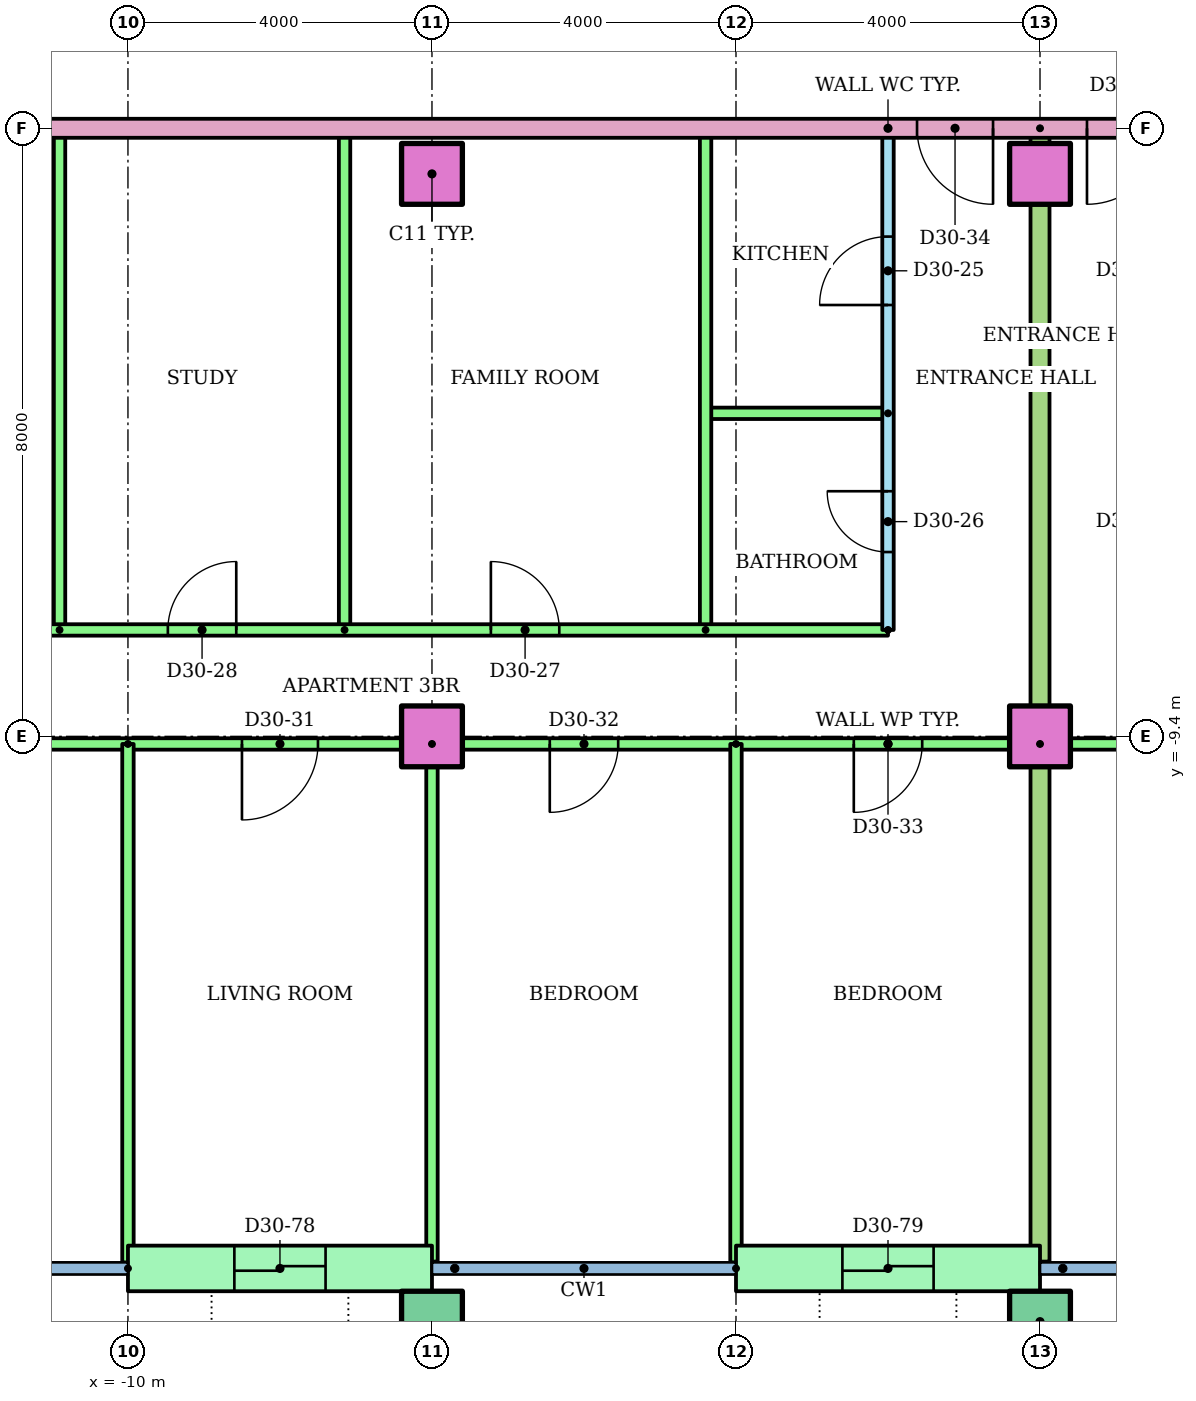
"""IFC4 building model, lengths in metres.
Left out: names, types, materials, properties, quantities, classifications, styles, units other than length and angle.
Written with IfcOpenShell. Run it as: python <this file> out.ifc"""

import sys

from ifc_helpers import new_model, si_unit, direction, frame, frame_2d, origin, origin_2d, place, context, subcontext, project, spatial, rectangle, hollow_rectangle, extrude, element, fill, save


model = new_model("IFC4")
c1 = context("Model", 3, precision=1e-05, world=origin(), true_north=direction((0.0, 1.0)))
c2 = subcontext(c1, "Body", "Model", "MODEL_VIEW")
j1 = project(units=[si_unit("LENGTHUNIT", "METRE"), si_unit("PLANEANGLEUNIT", "RADIAN")], contexts=[c1])
p1 = place(None, origin())
s1 = spatial("IfcSite", under=j1, at=p1, CompositionType="ELEMENT")
p2 = place(p1, origin())
s2 = spatial("IfcBuilding", under=s1, at=p2, CompositionType="ELEMENT")
p3 = place(p2, frame((0.0, 0.0, 119.8)))
s3 = spatial("IfcBuildingStorey", under=s2, at=p3, CompositionType="ELEMENT", Elevation=119.8)
for number, where in (
    (1, (-6.0, -17.1, 0.0)),
    (2, (2.0, -17.1, 0.0)),
):
    element("IfcColumn", number, at=place(p3, frame(where)), inside=s3, PredefinedType="COLUMN", context=c2, shape_type="SweptSolid", body=[
        extrude(hollow_rectangle(XDim=0.8, YDim=0.8, WallThickness=0.04, at=origin_2d()), origin(), (0.0, 0.0, 1.0), 3.2),
    ])
for number, where in (
    (3, (-6.0, -9.4, 0.0)),
    (4, (2.0, -9.4, 0.0)),
    (5, (-6.0, -2.0, 0.0)),
    (6, (2.0, -2.0, 0.0)),
):
    element("IfcColumn", number, at=place(p3, frame(where)), inside=s3, PredefinedType="COLUMN", context=c2, shape_type="SweptSolid", body=[
        extrude(rectangle(XDim=0.8, YDim=0.8, at=origin_2d()), origin(), (0.0, 0.0, 1.0), 3.2),
    ])
p4 = place(p3, frame((-10.0, -16.4, 0.0)))
e7 = element("IfcWall", 7, at=p4, inside=s3, PredefinedType="STANDARD", context=c2, shape_type="SweptSolid", body=[
    extrude(rectangle(XDim=4.0, YDim=0.6, at=frame_2d((2.0, 0.0))), origin(), (0.0, 0.0, 1.0), 2.92),
])
p5 = place(p4, frame((1.4, 0.0, 0.0)))
e8 = element("IfcOpeningElement", 8, at=p5, cuts=e7, PredefinedType="OPENING", context=c2, shape_type="SweptSolid", body=[
    extrude(rectangle(XDim=1.2, YDim=2.1, at=frame_2d((0.6, 1.05))), frame((0.0, 0.31, 0.0), z_axis=(0.0, -1.0, 0.0), x_axis=(1.0, 0.0, 0.0)), (0.0, 0.0, 1.0), 0.62),
])
p6 = place(p3, frame((-2.0, -16.4, 0.0)))
e9 = element("IfcWall", 9, at=p6, inside=s3, PredefinedType="STANDARD", context=c2, shape_type="SweptSolid", body=[
    extrude(rectangle(XDim=4.0, YDim=0.6, at=frame_2d((2.0, 0.0))), origin(), (0.0, 0.0, 1.0), 2.92),
])
p7 = place(p6, frame((1.4, 0.0, 0.0)))
e10 = element("IfcOpeningElement", 10, at=p7, cuts=e9, PredefinedType="OPENING", context=c2, shape_type="SweptSolid", body=[
    extrude(rectangle(XDim=1.2, YDim=2.1, at=frame_2d((0.6, 1.05))), frame((0.0, 0.31, 0.0), z_axis=(0.0, -1.0, 0.0), x_axis=(1.0, 0.0, 0.0)), (0.0, 0.0, 1.0), 0.62),
])
p8 = place(p3, frame((0.0, -8.0, 0.0), z_axis=(0.0, 0.0, 1.0), x_axis=(0.0, 1.0, 0.0)))
e11 = element("IfcWall", 11, at=p8, inside=s3, PredefinedType="PARTITIONING", context=c2, shape_type="SweptSolid", body=[
    extrude(rectangle(XDim=6.6, YDim=0.15, at=frame_2d((3.3, 0.0))), origin(), (0.0, 0.0, 1.0), 2.4),
])
p9 = place(p8, frame((4.275, 0.0, 0.0)))
e12 = element("IfcOpeningElement", 12, at=p9, cuts=e11, PredefinedType="OPENING", context=c2, shape_type="SweptSolid", body=[
    extrude(rectangle(XDim=0.9, YDim=2.1, at=frame_2d((0.45, 1.05))), frame((0.0, 0.085, 0.0), z_axis=(0.0, -1.0, 0.0), x_axis=(1.0, 0.0, 0.0)), (0.0, 0.0, 1.0), 0.17),
])
p10 = place(p8, frame((1.025, 0.0, 0.0)))
e13 = element("IfcOpeningElement", 13, at=p10, cuts=e11, PredefinedType="OPENING", context=c2, shape_type="SweptSolid", body=[
    extrude(rectangle(XDim=0.8, YDim=2.1, at=frame_2d((0.4, 1.05))), frame((0.0, 0.085, 0.0), z_axis=(0.0, -1.0, 0.0), x_axis=(1.0, 0.0, 0.0)), (0.0, 0.0, 1.0), 0.17),
])
p11 = place(p3, frame((0.0, -5.15, 0.0), z_axis=(0.0, 0.0, 1.0), x_axis=(-1.0, 0.0, 0.0)))
e14 = element("IfcWall", 14, at=p11, inside=s3, PredefinedType="PARTITIONING", context=c2, shape_type="SweptSolid", body=[
    extrude(rectangle(XDim=2.4, YDim=0.15, at=frame_2d((1.2, 0.0))), origin(), (0.0, 0.0, 1.0), 2.4),
])
for number, where, z_axis, x_axis in (
    (15, (-2.4, -8.0, 0.0), (0.0, 0.0, 1.0), (0.0, 1.0, 0.0)),
    (16, (-7.15, -8.0, 0.0), (0.0, 0.0, 1.0), (0.0, 1.0, 0.0)),
    (17, (-10.9, -8.0, 0.0), (0.0, 0.0, 1.0), (0.0, 1.0, 0.0)),
):
    element("IfcWall", number, at=place(p3, frame(where, z_axis=z_axis, x_axis=x_axis)), inside=s3, PredefinedType="PARTITIONING", context=c2, shape_type="SweptSolid", body=[
        extrude(rectangle(XDim=6.6, YDim=0.15, at=frame_2d((3.3, 0.0))), origin(), (0.0, 0.0, 1.0), 2.4),
    ])
p12 = place(p3, frame((-14.0, -8.0, 0.0)))
e18 = element("IfcWall", 18, at=p12, inside=s3, PredefinedType="PARTITIONING", context=c2, shape_type="SweptSolid", body=[
    extrude(rectangle(XDim=14.0, YDim=0.15, at=frame_2d((7.0, 0.0))), origin(), (0.0, 0.0, 1.0), 2.4),
])
p13 = place(p12, frame((8.775, 0.0, 0.0)))
e19 = element("IfcOpeningElement", 19, at=p13, cuts=e18, PredefinedType="OPENING", context=c2, shape_type="SweptSolid", body=[
    extrude(rectangle(XDim=0.9, YDim=2.1, at=frame_2d((0.45, 1.05))), frame((0.0, 0.085, 0.0), z_axis=(0.0, -1.0, 0.0), x_axis=(1.0, 0.0, 0.0)), (0.0, 0.0, 1.0), 0.17),
])
p14 = place(p12, frame((4.525, 0.0, 0.0)))
e20 = element("IfcOpeningElement", 20, at=p14, cuts=e18, PredefinedType="OPENING", context=c2, shape_type="SweptSolid", body=[
    extrude(rectangle(XDim=0.9, YDim=2.1, at=frame_2d((0.45, 1.05))), frame((0.0, 0.085, 0.0), z_axis=(0.0, -1.0, 0.0), x_axis=(1.0, 0.0, 0.0)), (0.0, 0.0, 1.0), 0.17),
])
p15 = place(p12, frame((1.1, 0.0, 0.0)))
e21 = element("IfcOpeningElement", 21, at=p15, cuts=e18, PredefinedType="OPENING", context=c2, shape_type="SweptSolid", body=[
    extrude(rectangle(XDim=0.9, YDim=2.1, at=frame_2d((0.45, 1.05))), frame((0.0, 0.085, 0.0), z_axis=(0.0, -1.0, 0.0), x_axis=(1.0, 0.0, 0.0)), (0.0, 0.0, 1.0), 0.17),
])
p16 = place(p3, frame((2.0, -9.5, 0.0), z_axis=(0.0, 0.0, 1.0), x_axis=(-1.0, 0.0, 0.0)))
e22 = element("IfcWall", 22, at=p16, inside=s3, PredefinedType="PARTITIONING", context=c2, shape_type="SweptSolid", body=[
    extrude(rectangle(XDim=16.0, YDim=0.15, at=frame_2d((8.0, 0.0))), origin(), (0.0, 0.0, 1.0), 2.4),
])
p17 = place(p16, frame((13.55, 0.0, 0.0)))
e23 = element("IfcOpeningElement", 23, at=p17, cuts=e22, PredefinedType="OPENING", context=c2, shape_type="SweptSolid", body=[
    extrude(rectangle(XDim=0.9, YDim=2.1, at=frame_2d((0.45, 1.05))), frame((0.0, 0.085, 0.0), z_axis=(0.0, -1.0, 0.0), x_axis=(1.0, 0.0, 0.0)), (0.0, 0.0, 1.0), 0.17),
])
p18 = place(p16, frame((9.5, 0.0, 0.0)))
e24 = element("IfcOpeningElement", 24, at=p18, cuts=e22, PredefinedType="OPENING", context=c2, shape_type="SweptSolid", body=[
    extrude(rectangle(XDim=1.0, YDim=2.1, at=frame_2d((0.5, 1.05))), frame((0.0, 0.085, 0.0), z_axis=(0.0, -1.0, 0.0), x_axis=(1.0, 0.0, 0.0)), (0.0, 0.0, 1.0), 0.17),
])
p19 = place(p16, frame((5.55, 0.0, 0.0)))
e25 = element("IfcOpeningElement", 25, at=p19, cuts=e22, PredefinedType="OPENING", context=c2, shape_type="SweptSolid", body=[
    extrude(rectangle(XDim=0.9, YDim=2.1, at=frame_2d((0.45, 1.05))), frame((0.0, 0.085, 0.0), z_axis=(0.0, -1.0, 0.0), x_axis=(1.0, 0.0, 0.0)), (0.0, 0.0, 1.0), 0.17),
])
p20 = place(p16, frame((1.55, 0.0, 0.0)))
e26 = element("IfcOpeningElement", 26, at=p20, cuts=e22, PredefinedType="OPENING", context=c2, shape_type="SweptSolid", body=[
    extrude(rectangle(XDim=0.9, YDim=2.1, at=frame_2d((0.45, 1.05))), frame((0.0, 0.085, 0.0), z_axis=(0.0, -1.0, 0.0), x_axis=(1.0, 0.0, 0.0)), (0.0, 0.0, 1.0), 0.17),
])
p21 = place(p3, frame((-10.0, -9.5, 0.0), z_axis=(0.0, 0.0, 1.0), x_axis=(0.0, -1.0, 0.0)))
e27 = element("IfcWall", 27, at=p21, inside=s3, PredefinedType="PARTITIONING", context=c2, shape_type="SweptSolid", body=[
    extrude(rectangle(XDim=6.821, YDim=0.15, at=frame_2d((3.411, 0.0))), origin(), (0.0, 0.0, 1.0), 2.4),
])
p22 = place(p3, frame((-6.0, -9.5, 0.0), z_axis=(0.0, 0.0, 1.0), x_axis=(0.0, -1.0, 0.0)))
e28 = element("IfcWall", 28, at=p22, inside=s3, PredefinedType="PARTITIONING", context=c2, shape_type="SweptSolid", body=[
    extrude(rectangle(XDim=6.81, YDim=0.15, at=frame_2d((3.405, 0.0))), origin(), (0.0, 0.0, 1.0), 2.4),
])
p23 = place(p3, frame((-2.0, -9.5, 0.0), z_axis=(0.0, 0.0, 1.0), x_axis=(0.0, -1.0, 0.0)))
e29 = element("IfcWall", 29, at=p23, inside=s3, PredefinedType="PARTITIONING", context=c2, shape_type="SweptSolid", body=[
    extrude(rectangle(XDim=6.821, YDim=0.15, at=frame_2d((3.411, 0.0))), origin(), (0.0, 0.0, 1.0), 2.4),
])
p24 = place(p3, frame((18.0, -9.5, 0.0), z_axis=(0.0, 0.0, 1.0), x_axis=(-1.0, 0.0, 0.0)))
e30 = element("IfcWall", 30, at=p24, inside=s3, PredefinedType="PARTITIONING", context=c2, shape_type="SweptSolid", body=[
    extrude(rectangle(XDim=16.0, YDim=0.15, at=frame_2d((8.0, 0.0))), origin(), (0.0, 0.0, 1.0), 2.4),
])
p25 = place(p24, frame((13.55, 0.0, 0.0)))
e31 = element("IfcOpeningElement", 31, at=p25, cuts=e30, PredefinedType="OPENING", context=c2, shape_type="SweptSolid", body=[
    extrude(rectangle(XDim=0.9, YDim=2.1, at=frame_2d((0.45, 1.05))), frame((0.0, 0.085, 0.0), z_axis=(0.0, -1.0, 0.0), x_axis=(1.0, 0.0, 0.0)), (0.0, 0.0, 1.0), 0.17),
])
p26 = place(p24, frame((9.55, 0.0, 0.0)))
e32 = element("IfcOpeningElement", 32, at=p26, cuts=e30, PredefinedType="OPENING", context=c2, shape_type="SweptSolid", body=[
    extrude(rectangle(XDim=0.9, YDim=2.1, at=frame_2d((0.45, 1.05))), frame((0.0, 0.085, 0.0), z_axis=(0.0, -1.0, 0.0), x_axis=(1.0, 0.0, 0.0)), (0.0, 0.0, 1.0), 0.17),
])
p27 = place(p24, frame((5.55, 0.0, 0.0)))
e33 = element("IfcOpeningElement", 33, at=p27, cuts=e30, PredefinedType="OPENING", context=c2, shape_type="SweptSolid", body=[
    extrude(rectangle(XDim=0.9, YDim=2.1, at=frame_2d((0.45, 1.05))), frame((0.0, 0.085, 0.0), z_axis=(0.0, -1.0, 0.0), x_axis=(1.0, 0.0, 0.0)), (0.0, 0.0, 1.0), 0.17),
])
p28 = place(p24, frame((1.5, 0.0, 0.0)))
e34 = element("IfcOpeningElement", 34, at=p28, cuts=e30, PredefinedType="OPENING", context=c2, shape_type="SweptSolid", body=[
    extrude(rectangle(XDim=1.0, YDim=2.1, at=frame_2d((0.5, 1.05))), frame((0.0, 0.085, 0.0), z_axis=(0.0, -1.0, 0.0), x_axis=(1.0, 0.0, 0.0)), (0.0, 0.0, 1.0), 0.17),
])
p29 = place(p3, frame((2.0, -1.4, 0.0), z_axis=(0.0, 0.0, 1.0), x_axis=(0.0, -1.0, 0.0)))
e35 = element("IfcWall", 35, at=p29, inside=s3, PredefinedType="PARTITIONING", context=c2, shape_type="SweptSolid", body=[
    extrude(rectangle(XDim=14.91, YDim=0.25, at=frame_2d((7.455, 0.0))), origin(), (0.0, 0.0, 1.0), 2.4),
])
p30 = place(p3, frame((14.0, -1.4, 0.0), z_axis=(0.0, 0.0, 1.0), x_axis=(-1.0, 0.0, 0.0)))
e36 = element("IfcWall", 36, at=p30, inside=s3, PredefinedType="PARTITIONING", context=c2, shape_type="SweptSolid", body=[
    extrude(rectangle(XDim=28.0, YDim=0.25, at=frame_2d((14.0, 0.0))), origin(), (0.0, 0.0, 1.0), 2.4),
])
p31 = place(p30, frame((12.618, 0.0, 0.0)))
e37 = element("IfcOpeningElement", 37, at=p31, cuts=e36, PredefinedType="OPENING", context=c2, shape_type="SweptSolid", body=[
    extrude(rectangle(XDim=1.0, YDim=2.1, at=frame_2d((0.5, 1.05))), frame((0.0, 0.135, 0.0), z_axis=(0.0, -1.0, 0.0), x_axis=(1.0, 0.0, 0.0)), (0.0, 0.0, 1.0), 0.27),
])
p32 = place(p30, frame((10.382, 0.0, 0.0)))
e38 = element("IfcOpeningElement", 38, at=p32, cuts=e36, PredefinedType="OPENING", context=c2, shape_type="SweptSolid", body=[
    extrude(rectangle(XDim=1.0, YDim=2.1, at=frame_2d((0.5, 1.05))), frame((0.0, 0.135, 0.0), z_axis=(0.0, -1.0, 0.0), x_axis=(1.0, 0.0, 0.0)), (0.0, 0.0, 1.0), 0.27),
])
p33 = place(p9, origin())
e39 = element("IfcDoor", 39, at=p33, inside=s3, OperationType="SINGLE_SWING_LEFT", PredefinedType="DOOR", context=c2, shape_type="SweptSolid", body=[
    extrude(rectangle(XDim=0.9, YDim=2.1, at=frame_2d((0.45, 1.05))), frame((0.0, 0.025, 0.0), z_axis=(0.0, -1.0, 0.0), x_axis=(1.0, 0.0, 0.0)), (0.0, 0.0, 1.0), 0.05),
])
fill(e12, e39)
p34 = place(p10, origin())
e40 = element("IfcDoor", 40, at=p34, inside=s3, OperationType="SINGLE_SWING_RIGHT", PredefinedType="DOOR", context=c2, shape_type="SweptSolid", body=[
    extrude(rectangle(XDim=0.8, YDim=2.1, at=frame_2d((0.4, 1.05))), frame((0.0, 0.025, 0.0), z_axis=(0.0, -1.0, 0.0), x_axis=(1.0, 0.0, 0.0)), (0.0, 0.0, 1.0), 0.05),
])
fill(e13, e40)
p35 = place(p13, origin())
e41 = element("IfcDoor", 41, at=p35, inside=s3, OperationType="SINGLE_SWING_LEFT", PredefinedType="DOOR", context=c2, shape_type="SweptSolid", body=[
    extrude(rectangle(XDim=0.9, YDim=2.1, at=frame_2d((0.45, 1.05))), frame((0.0, 0.025, 0.0), z_axis=(0.0, -1.0, 0.0), x_axis=(1.0, 0.0, 0.0)), (0.0, 0.0, 1.0), 0.05),
])
fill(e19, e41)
p36 = place(p14, origin())
e42 = element("IfcDoor", 42, at=p36, inside=s3, OperationType="SINGLE_SWING_RIGHT", PredefinedType="DOOR", context=c2, shape_type="SweptSolid", body=[
    extrude(rectangle(XDim=0.9, YDim=2.1, at=frame_2d((0.45, 1.05))), frame((0.0, 0.025, 0.0), z_axis=(0.0, -1.0, 0.0), x_axis=(1.0, 0.0, 0.0)), (0.0, 0.0, 1.0), 0.05),
])
fill(e20, e42)
p37 = place(p18, origin())
e43 = element("IfcDoor", 43, at=p37, inside=s3, OperationType="SINGLE_SWING_RIGHT", PredefinedType="DOOR", context=c2, shape_type="SweptSolid", body=[
    extrude(rectangle(XDim=1.0, YDim=2.1, at=frame_2d((0.5, 1.05))), frame((0.0, 0.025, 0.0), z_axis=(0.0, -1.0, 0.0), x_axis=(1.0, 0.0, 0.0)), (0.0, 0.0, 1.0), 0.05),
])
fill(e24, e43)
p38 = place(p19, origin())
e44 = element("IfcDoor", 44, at=p38, inside=s3, OperationType="SINGLE_SWING_RIGHT", PredefinedType="DOOR", context=c2, shape_type="SweptSolid", body=[
    extrude(rectangle(XDim=0.9, YDim=2.1, at=frame_2d((0.45, 1.05))), frame((0.0, 0.025, 0.0), z_axis=(0.0, -1.0, 0.0), x_axis=(1.0, 0.0, 0.0)), (0.0, 0.0, 1.0), 0.05),
])
fill(e25, e44)
p39 = place(p20, origin())
e45 = element("IfcDoor", 45, at=p39, inside=s3, OperationType="SINGLE_SWING_RIGHT", PredefinedType="DOOR", context=c2, shape_type="SweptSolid", body=[
    extrude(rectangle(XDim=0.9, YDim=2.1, at=frame_2d((0.45, 1.05))), frame((0.0, 0.025, 0.0), z_axis=(0.0, -1.0, 0.0), x_axis=(1.0, 0.0, 0.0)), (0.0, 0.0, 1.0), 0.05),
])
fill(e26, e45)
p40 = place(p31, origin())
e46 = element("IfcDoor", 46, at=p40, inside=s3, OperationType="SINGLE_SWING_LEFT", PredefinedType="DOOR", context=c2, shape_type="SweptSolid", body=[
    extrude(rectangle(XDim=1.0, YDim=2.1, at=frame_2d((0.5, 1.05))), frame((0.0, 0.025, 0.0), z_axis=(0.0, -1.0, 0.0), x_axis=(1.0, 0.0, 0.0)), (0.0, 0.0, 1.0), 0.05),
])
fill(e37, e46)
p41 = place(p32, origin())
e47 = element("IfcDoor", 47, at=p41, inside=s3, OperationType="SINGLE_SWING_RIGHT", PredefinedType="DOOR", context=c2, shape_type="SweptSolid", body=[
    extrude(rectangle(XDim=1.0, YDim=2.1, at=frame_2d((0.5, 1.05))), frame((0.0, 0.025, 0.0), z_axis=(0.0, -1.0, 0.0), x_axis=(1.0, 0.0, 0.0)), (0.0, 0.0, 1.0), 0.05),
])
fill(e38, e47)
p42 = place(p5, origin())
e48 = element("IfcDoor", 48, at=p42, inside=s3, OperationType="SLIDING_TO_LEFT", PredefinedType="DOOR", context=c2, shape_type="SweptSolid", body=[
    extrude(rectangle(XDim=1.2, YDim=2.1, at=frame_2d((0.6, 1.05))), frame((0.0, 0.025, 0.0), z_axis=(0.0, -1.0, 0.0), x_axis=(1.0, 0.0, 0.0)), (0.0, 0.0, 1.0), 0.05),
])
fill(e8, e48)
p43 = place(p7, origin())
e49 = element("IfcDoor", 49, at=p43, inside=s3, OperationType="SLIDING_TO_LEFT", PredefinedType="DOOR", context=c2, shape_type="SweptSolid", body=[
    extrude(rectangle(XDim=1.2, YDim=2.1, at=frame_2d((0.6, 1.05))), frame((0.0, 0.025, 0.0), z_axis=(0.0, -1.0, 0.0), x_axis=(1.0, 0.0, 0.0)), (0.0, 0.0, 1.0), 0.05),
])
fill(e10, e49)
save(model, sys.argv[1])
